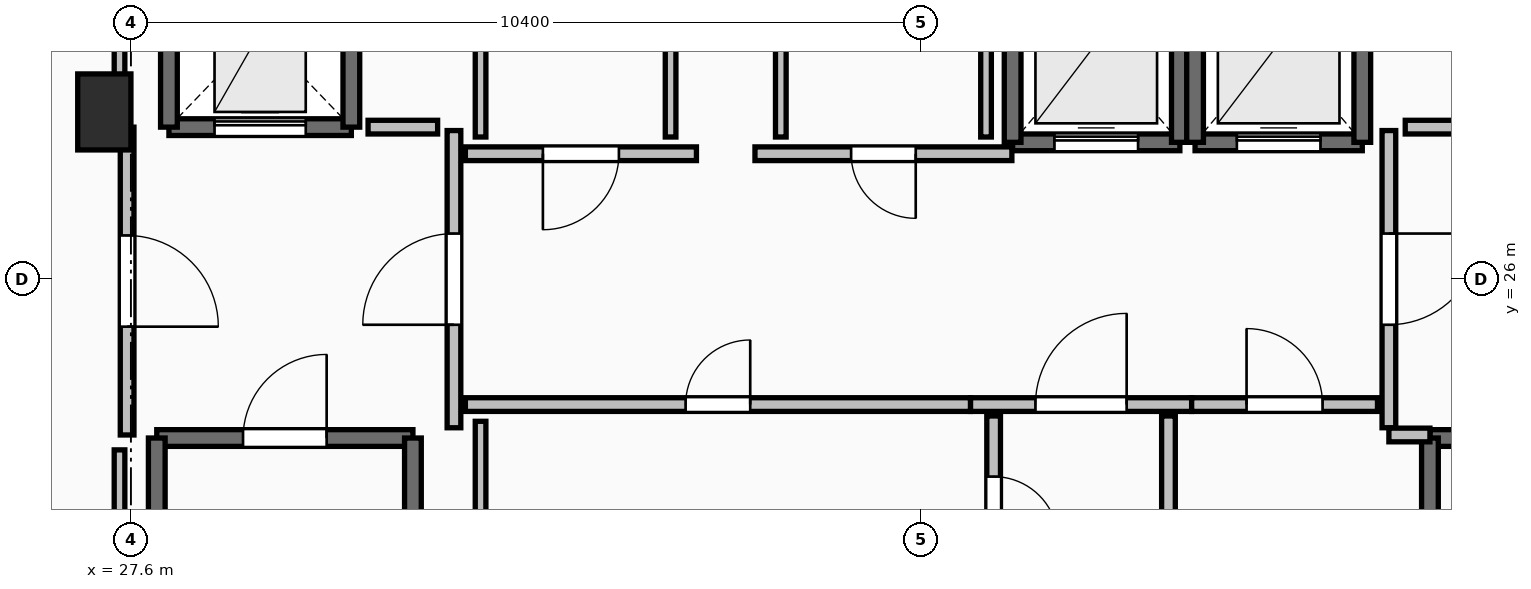
"""IFC4 building model, lengths in metres.
Left out: names, types, materials, properties, quantities, classifications, styles, units other than length and angle.
Written with IfcOpenShell. Run it as: python <this file> out.ifc"""

import sys

from ifc_helpers import new_model, si_unit, direction, frame, frame_2d, origin, origin_2d, place, context, subcontext, project, spatial, rectangle, extrude, element, fill, save


model = new_model("IFC4")
c1 = context("Model", 3, precision=1e-05, world=origin(), true_north=direction((0.0, 1.0)))
c2 = subcontext(c1, "Body", "Model", "MODEL_VIEW")
j1 = project(units=[si_unit("LENGTHUNIT", "METRE"), si_unit("PLANEANGLEUNIT", "RADIAN")], contexts=[c1])
p1 = place(None, origin())
s1 = spatial("IfcSite", under=j1, at=p1, CompositionType="ELEMENT")
p2 = place(p1, origin())
s2 = spatial("IfcBuilding", under=s1, at=p2, CompositionType="ELEMENT")
p3 = place(p2, frame((0.0, 0.0, 273.3)))
s3 = spatial("IfcBuildingStorey", under=s2, at=p3, CompositionType="ELEMENT", Elevation=273.3)
p4 = place(p3, frame((27.25, 28.2, 0.0), z_axis=(0.0, 0.0, 1.0), x_axis=(1.0, 0.0, 0.0)))
e1 = element("IfcColumn", 1, at=p4, inside=s3, PredefinedType="PILASTER", context=c2, shape_type="SweptSolid", body=[
    extrude(rectangle(XDim=0.7, YDim=1.0, at=origin_2d()), origin(), (0.0, 0.0, 1.0), 3.55),
])
p5 = place(p3, frame((27.94, 23.91, 0.0), z_axis=(0.0, 0.0, 1.0), x_axis=(1.0, 0.0, 0.0)))
e2 = element("IfcWall", 2, at=p5, inside=s3, PredefinedType="SOLIDWALL", context=c2, shape_type="SweptSolid", body=[
    extrude(rectangle(XDim=3.37, YDim=0.22, at=frame_2d((1.685, 0.0))), origin(), (0.0, 0.0, 1.0), 3.29),
])
p6 = place(p5, frame((1.135, 0.0, 0.0)))
e3 = element("IfcOpeningElement", 3, at=p6, cuts=e2, PredefinedType="OPENING", context=c2, shape_type="SweptSolid", body=[
    extrude(rectangle(XDim=1.1, YDim=2.15, at=frame_2d((0.55, 1.075))), frame((0.0, 0.125, 0.0), z_axis=(0.0, -1.0, 0.0), x_axis=(1.0, 0.0, 0.0)), (0.0, 0.0, 1.0), 0.25),
])
for number, where, z_axis, x_axis in (
    (4, (31.31, 23.91, 0.0), (0.0, 0.0, 1.0), (0.0, -1.0, 0.0)),
    (5, (27.94, 16.49, 0.0), (0.0, 0.0, 1.0), (0.0, 1.0, 0.0)),
):
    element("IfcWall", number, at=place(p3, frame(where, z_axis=z_axis, x_axis=x_axis)), inside=s3, PredefinedType="SOLIDWALL", context=c2, shape_type="SweptSolid", body=[
        extrude(rectangle(XDim=7.42, YDim=0.22, at=frame_2d((3.71, 0.0))), origin(), (0.0, 0.0, 1.0), 3.29),
    ])
p7 = place(p3, frame((44.69, 23.91, 0.0), z_axis=(0.0, 0.0, 1.0), x_axis=(1.0, 0.0, 0.0)))
e6 = element("IfcWall", 6, at=p7, inside=s3, PredefinedType="SOLIDWALL", context=c2, shape_type="SweptSolid", body=[
    extrude(rectangle(XDim=3.37, YDim=0.22, at=frame_2d((1.685, 0.0))), origin(), (0.0, 0.0, 1.0), 3.29),
])
p8 = place(p7, frame((1.135, 0.0, 0.0)))
e7 = element("IfcOpeningElement", 7, at=p8, cuts=e6, PredefinedType="OPENING", context=c2, shape_type="SweptSolid", body=[
    extrude(rectangle(XDim=1.1, YDim=2.15, at=frame_2d((0.55, 1.075))), frame((0.0, 0.125, 0.0), z_axis=(0.0, -1.0, 0.0), x_axis=(1.0, 0.0, 0.0)), (0.0, 0.0, 1.0), 0.25),
])
p9 = place(p3, frame((44.69, 16.49, 0.0), z_axis=(0.0, 0.0, 1.0), x_axis=(0.0, 1.0, 0.0)))
e8 = element("IfcWall", 8, at=p9, inside=s3, PredefinedType="SOLIDWALL", context=c2, shape_type="SweptSolid", body=[
    extrude(rectangle(XDim=7.42, YDim=0.22, at=frame_2d((3.71, 0.0))), origin(), (0.0, 0.0, 1.0), 3.29),
])
p10 = place(p3, frame((39.2, 27.8, 0.0), z_axis=(0.0, 0.0, 1.0), x_axis=(1.0, 0.0, 0.0)))
e9 = element("IfcWall", 9, at=p10, inside=s3, PredefinedType="SOLIDWALL", context=c2, shape_type="SweptSolid", body=[
    extrude(rectangle(XDim=2.2, YDim=0.22, at=frame_2d((1.1, 0.0))), origin(), (0.0, 0.0, 1.0), 3.29),
])
p11 = place(p10, frame((0.55, 0.0, 0.0)))
e10 = element("IfcOpeningElement", 10, at=p11, cuts=e9, PredefinedType="OPENING", context=c2, shape_type="SweptSolid", body=[
    extrude(rectangle(XDim=1.1, YDim=2.2, at=frame_2d((0.55, 1.1))), frame((0.0, 0.125, 0.0), z_axis=(0.0, -1.0, 0.0), x_axis=(1.0, 0.0, 0.0)), (0.0, 0.0, 1.0), 0.25),
])
for number, where, z_axis, x_axis in (
    (11, (41.4, 27.8, 0.0), (0.0, 0.0, 1.0), (0.0, 1.0, 0.0)),
    (12, (39.2, 30.4, 0.0), (0.0, 0.0, 1.0), (0.0, -1.0, 0.0)),
):
    element("IfcWall", number, at=place(p3, frame(where, z_axis=z_axis, x_axis=x_axis)), inside=s3, PredefinedType="SOLIDWALL", context=c2, shape_type="SweptSolid", body=[
        extrude(rectangle(XDim=2.6, YDim=0.22, at=frame_2d((1.3, 0.0))), origin(), (0.0, 0.0, 1.0), 3.29),
    ])
p12 = place(p3, frame((41.6, 27.8, 0.0), z_axis=(0.0, 0.0, 1.0), x_axis=(1.0, 0.0, 0.0)))
e13 = element("IfcWall", 13, at=p12, inside=s3, PredefinedType="SOLIDWALL", context=c2, shape_type="SweptSolid", body=[
    extrude(rectangle(XDim=2.2, YDim=0.22, at=frame_2d((1.1, 0.0))), origin(), (0.0, 0.0, 1.0), 3.29),
])
p13 = place(p12, frame((0.55, 0.0, 0.0)))
e14 = element("IfcOpeningElement", 14, at=p13, cuts=e13, PredefinedType="OPENING", context=c2, shape_type="SweptSolid", body=[
    extrude(rectangle(XDim=1.1, YDim=2.2, at=frame_2d((0.55, 1.1))), frame((0.0, 0.125, 0.0), z_axis=(0.0, -1.0, 0.0), x_axis=(1.0, 0.0, 0.0)), (0.0, 0.0, 1.0), 0.25),
])
for number, where, z_axis, x_axis in (
    (15, (43.8, 27.8, 0.0), (0.0, 0.0, 1.0), (0.0, 1.0, 0.0)),
    (16, (41.6, 30.4, 0.0), (0.0, 0.0, 1.0), (0.0, -1.0, 0.0)),
):
    element("IfcWall", number, at=place(p3, frame(where, z_axis=z_axis, x_axis=x_axis)), inside=s3, PredefinedType="SOLIDWALL", context=c2, shape_type="SweptSolid", body=[
        extrude(rectangle(XDim=2.6, YDim=0.22, at=frame_2d((1.3, 0.0))), origin(), (0.0, 0.0, 1.0), 3.29),
    ])
p14 = place(p3, frame((28.1, 28.0, 0.0), z_axis=(0.0, 0.0, 1.0), x_axis=(1.0, 0.0, 0.0)))
e17 = element("IfcWall", 17, at=p14, inside=s3, PredefinedType="SHEAR", context=c2, shape_type="SweptSolid", body=[
    extrude(rectangle(XDim=2.4, YDim=0.22, at=frame_2d((1.2, 0.0))), origin(), (0.0, 0.0, 1.0), 3.29),
])
p15 = place(p14, frame((0.6, 0.0, 0.0)))
e18 = element("IfcOpeningElement", 18, at=p15, cuts=e17, PredefinedType="OPENING", context=c2, shape_type="SweptSolid", body=[
    extrude(rectangle(XDim=1.2, YDim=2.2, at=frame_2d((0.6, 1.1))), frame((0.0, 0.125, 0.0), z_axis=(0.0, -1.0, 0.0), x_axis=(1.0, 0.0, 0.0)), (0.0, 0.0, 1.0), 0.25),
])
for number, where, z_axis, x_axis in (
    (19, (30.5, 28.0, 0.0), (0.0, 0.0, 1.0), (0.0, 1.0, 0.0)),
    (20, (28.1, 30.5, 0.0), (0.0, 0.0, 1.0), (0.0, -1.0, 0.0)),
):
    element("IfcWall", number, at=place(p3, frame(where, z_axis=z_axis, x_axis=x_axis)), inside=s3, PredefinedType="SHEAR", context=c2, shape_type="SweptSolid", body=[
        extrude(rectangle(XDim=2.5, YDim=0.22, at=frame_2d((1.25, 0.0))), origin(), (0.0, 0.0, 1.0), 3.29),
    ])
p16 = place(p3, frame((31.85, 24.045, 0.0), z_axis=(0.0, 0.0, 1.0), x_axis=(0.0, 1.0, 0.0)))
e21 = element("IfcWall", 21, at=p16, inside=s3, PredefinedType="PARTITIONING", context=c2, shape_type="SweptSolid", body=[
    extrude(rectangle(XDim=3.91, YDim=0.18, at=frame_2d((1.955, 0.0))), origin(), (0.0, 0.0, 1.0), 3.29),
])
p17 = place(p16, frame((1.355, 0.0, 0.0)))
e22 = element("IfcOpeningElement", 22, at=p17, cuts=e21, PredefinedType="OPENING", context=c2, shape_type="SweptSolid", body=[
    extrude(rectangle(XDim=1.2, YDim=2.15, at=frame_2d((0.6, 1.075))), frame((0.0, 0.105, 0.0), z_axis=(0.0, -1.0, 0.0), x_axis=(1.0, 0.0, 0.0)), (0.0, 0.0, 1.0), 0.21),
])
p18 = place(p3, frame((27.55, 28.0, 0.0), z_axis=(0.0, 0.0, 1.0), x_axis=(0.0, -1.0, 0.0)))
e23 = element("IfcWall", 23, at=p18, inside=s3, PredefinedType="PARTITIONING", context=c2, shape_type="SweptSolid", body=[
    extrude(rectangle(XDim=4.05, YDim=0.18, at=frame_2d((2.025, 0.0))), origin(), (0.0, 0.0, 1.0), 3.29),
])
p19 = place(p18, frame((1.425, 0.0, 0.0)))
e24 = element("IfcOpeningElement", 24, at=p19, cuts=e23, PredefinedType="OPENING", context=c2, shape_type="SweptSolid", body=[
    extrude(rectangle(XDim=1.2, YDim=2.15, at=frame_2d((0.6, 1.075))), frame((0.0, 0.105, 0.0), z_axis=(0.0, -1.0, 0.0), x_axis=(1.0, 0.0, 0.0)), (0.0, 0.0, 1.0), 0.21),
])
p20 = place(p3, frame((44.15, 27.955, 0.0), z_axis=(0.0, 0.0, 1.0), x_axis=(0.0, -1.0, 0.0)))
e25 = element("IfcWall", 25, at=p20, inside=s3, PredefinedType="PARTITIONING", context=c2, shape_type="SweptSolid", body=[
    extrude(rectangle(XDim=3.91, YDim=0.18, at=frame_2d((1.955, 0.0))), origin(), (0.0, 0.0, 1.0), 3.29),
])
p21 = place(p20, frame((1.355, 0.0, 0.0)))
e26 = element("IfcOpeningElement", 26, at=p21, cuts=e25, PredefinedType="OPENING", context=c2, shape_type="SweptSolid", body=[
    extrude(rectangle(XDim=1.2, YDim=2.15, at=frame_2d((0.6, 1.075))), frame((0.0, 0.105, 0.0), z_axis=(0.0, -1.0, 0.0), x_axis=(1.0, 0.0, 0.0)), (0.0, 0.0, 1.0), 0.21),
])
p22 = place(p3, frame((44.15, 23.95, 0.0), z_axis=(0.0, 0.0, 1.0), x_axis=(1.0, 0.0, 0.0)))
e27 = element("IfcWall", 27, at=p22, inside=s3, PredefinedType="PARTITIONING", context=c2, shape_type="SweptSolid", body=[
    extrude(rectangle(XDim=0.54, YDim=0.18, at=frame_2d((0.27, 0.0))), origin(), (0.0, 0.0, 1.0), 3.29),
])
p23 = place(p3, frame((38.645, 24.35, 0.0), z_axis=(0.0, 0.0, 1.0), x_axis=(1.0, 0.0, 0.0)))
e28 = element("IfcWall", 28, at=p23, inside=s3, PredefinedType="PARTITIONING", context=c2, shape_type="SweptSolid", body=[
    extrude(rectangle(XDim=2.91, YDim=0.18, at=frame_2d((1.455, 0.0))), origin(), (0.0, 0.0, 1.0), 3.29),
])
p24 = place(p23, frame((0.855, 0.0, 0.0)))
e29 = element("IfcOpeningElement", 29, at=p24, cuts=e28, PredefinedType="OPENING", context=c2, shape_type="SweptSolid", body=[
    extrude(rectangle(XDim=1.2, YDim=2.15, at=frame_2d((0.6, 1.075))), frame((0.0, 0.105, 0.0), z_axis=(0.0, -1.0, 0.0), x_axis=(1.0, 0.0, 0.0)), (0.0, 0.0, 1.0), 0.21),
])
p25 = place(p3, frame((41.555, 24.35, 0.0), z_axis=(0.0, 0.0, 1.0), x_axis=(1.0, 0.0, 0.0)))
e30 = element("IfcWall", 30, at=p25, inside=s3, PredefinedType="PARTITIONING", context=c2, shape_type="SweptSolid", body=[
    extrude(rectangle(XDim=2.445, YDim=0.18, at=frame_2d((1.223, 0.0))), origin(), (0.0, 0.0, 1.0), 3.29),
])
p26 = place(p25, frame((0.722, 0.0, 0.0)))
e31 = element("IfcOpeningElement", 31, at=p26, cuts=e30, PredefinedType="OPENING", context=c2, shape_type="SweptSolid", body=[
    extrude(rectangle(XDim=1.0, YDim=2.15, at=frame_2d((0.5, 1.075))), frame((0.0, 0.105, 0.0), z_axis=(0.0, -1.0, 0.0), x_axis=(1.0, 0.0, 0.0)), (0.0, 0.0, 1.0), 0.21),
])
p27 = place(p3, frame((35.04, 27.65, 0.0), z_axis=(0.0, 0.0, 1.0), x_axis=(-1.0, 0.0, 0.0)))
e32 = element("IfcWall", 32, at=p27, inside=s3, PredefinedType="PARTITIONING", context=c2, shape_type="SweptSolid", body=[
    extrude(rectangle(XDim=3.04, YDim=0.18, at=frame_2d((1.52, 0.0))), origin(), (0.0, 0.0, 1.0), 3.29),
])
p28 = place(p27, frame((1.02, 0.0, 0.0)))
e33 = element("IfcOpeningElement", 33, at=p28, cuts=e32, PredefinedType="OPENING", context=c2, shape_type="SweptSolid", body=[
    extrude(rectangle(XDim=1.0, YDim=2.15, at=frame_2d((0.5, 1.075))), frame((0.0, 0.105, 0.0), z_axis=(0.0, -1.0, 0.0), x_axis=(1.0, 0.0, 0.0)), (0.0, 0.0, 1.0), 0.21),
])
p29 = place(p3, frame((39.19, 27.65, 0.0), z_axis=(0.0, 0.0, 1.0), x_axis=(-1.0, 0.0, 0.0)))
e34 = element("IfcWall", 34, at=p29, inside=s3, PredefinedType="PARTITIONING", context=c2, shape_type="SweptSolid", body=[
    extrude(rectangle(XDim=3.38, YDim=0.18, at=frame_2d((1.69, 0.0))), origin(), (0.0, 0.0, 1.0), 3.29),
])
p30 = place(p29, frame((1.265, 0.0, 0.0)))
e35 = element("IfcOpeningElement", 35, at=p30, cuts=e34, PredefinedType="OPENING", context=c2, shape_type="SweptSolid", body=[
    extrude(rectangle(XDim=0.85, YDim=2.1, at=frame_2d((0.425, 1.05))), frame((0.0, 0.105, 0.0), z_axis=(0.0, -1.0, 0.0), x_axis=(1.0, 0.0, 0.0)), (0.0, 0.0, 1.0), 0.21),
])
p31 = place(p3, frame((32.0, 24.35, 0.0), z_axis=(0.0, 0.0, 1.0), x_axis=(1.0, 0.0, 0.0)))
e36 = element("IfcWall", 36, at=p31, inside=s3, PredefinedType="PARTITIONING", context=c2, shape_type="SweptSolid", body=[
    extrude(rectangle(XDim=6.645, YDim=0.18, at=frame_2d((3.323, 0.0))), origin(), (0.0, 0.0, 1.0), 3.29),
])
p32 = place(p31, frame((2.897, 0.0, 0.0)))
e37 = element("IfcOpeningElement", 37, at=p32, cuts=e36, PredefinedType="OPENING", context=c2, shape_type="SweptSolid", body=[
    extrude(rectangle(XDim=0.85, YDim=2.1, at=frame_2d((0.425, 1.05))), frame((0.0, 0.105, 0.0), z_axis=(0.0, -1.0, 0.0), x_axis=(1.0, 0.0, 0.0)), (0.0, 0.0, 1.0), 0.21),
])
p33 = place(p3, frame((41.25, 20.305, 0.0), z_axis=(0.0, 0.0, 1.0), x_axis=(0.0, 1.0, 0.0)))
e38 = element("IfcWall", 38, at=p33, inside=s3, PredefinedType="PARTITIONING", context=c2, shape_type="SweptSolid", body=[
    extrude(rectangle(XDim=3.895, YDim=0.18, at=frame_2d((1.948, 0.0))), origin(), (0.0, 0.0, 1.0), 2.482),
])
p34 = place(p33, frame((1.448, 0.0, 0.0)))
e39 = element("IfcOpeningElement", 39, at=p34, cuts=e38, PredefinedType="OPENING", context=c2, shape_type="SweptSolid", body=[
    extrude(rectangle(XDim=1.0, YDim=2.15, at=frame_2d((0.5, 1.075))), frame((0.0, 0.105, 0.0), z_axis=(0.0, -1.0, 0.0), x_axis=(1.0, 0.0, 0.0)), (0.0, 0.0, 1.0), 0.21),
])
p35 = place(p3, frame((38.95, 24.2, 0.0), z_axis=(0.0, 0.0, 1.0), x_axis=(0.0, -1.0, 0.0)))
e40 = element("IfcWall", 40, at=p35, inside=s3, PredefinedType="PARTITIONING", context=c2, shape_type="SweptSolid", body=[
    extrude(rectangle(XDim=2.445, YDim=0.18, at=frame_2d((1.223, 0.0))), origin(), (0.0, 0.0, 1.0), 2.482),
])
p36 = place(p35, frame((0.798, 0.0, 0.0)))
e41 = element("IfcOpeningElement", 41, at=p36, cuts=e40, PredefinedType="OPENING", context=c2, shape_type="SweptSolid", body=[
    extrude(rectangle(XDim=0.85, YDim=2.1, at=frame_2d((0.425, 1.05))), frame((0.0, 0.105, 0.0), z_axis=(0.0, -1.0, 0.0), x_axis=(1.0, 0.0, 0.0)), (0.0, 0.0, 1.0), 0.21),
])
for number, where, z_axis, x_axis in (
    (42, (31.635, 28.0, 0.0), (0.0, 0.0, 1.0), (-1.0, 0.0, 0.0)),
    (43, (45.28, 28.0, 0.0), (0.0, 0.0, 1.0), (-1.0, 0.0, 0.0)),
):
    element("IfcWall", number, at=place(p3, frame(where, z_axis=z_axis, x_axis=x_axis)), inside=s3, PredefinedType="PARTITIONING", context=c2, shape_type="SweptSolid", body=[
        extrude(rectangle(XDim=0.915, YDim=0.18, at=frame_2d((0.458, 0.0))), origin(), (0.0, 0.0, 1.0), 3.29),
    ])
for number, where, z_axis, x_axis in (
    (44, (32.2, 30.26, 0.0), (0.0, 0.0, 1.0), (0.0, -1.0, 0.0)),
    (45, (34.7, 27.87, 0.0), (0.0, 0.0, 1.0), (0.0, 1.0, 0.0)),
    (46, (36.15, 30.26, 0.0), (0.0, 0.0, 1.0), (0.0, -1.0, 0.0)),
    (47, (38.85, 27.87, 0.0), (0.0, 0.0, 1.0), (0.0, 1.0, 0.0)),
):
    element("IfcWall", number, at=place(p3, frame(where, z_axis=z_axis, x_axis=x_axis)), inside=s3, PredefinedType="PARTITIONING", context=c2, shape_type="SweptSolid", body=[
        extrude(rectangle(XDim=2.39, YDim=0.14, at=frame_2d((1.195, 0.0))), origin(), (0.0, 0.0, 1.0), 3.29),
    ])
p37 = place(p3, frame((32.2, 24.13, 0.0), z_axis=(0.0, 0.0, 1.0), x_axis=(0.0, -1.0, 0.0)))
e48 = element("IfcWall", 48, at=p37, inside=s3, PredefinedType="PARTITIONING", context=c2, shape_type="SweptSolid", body=[
    extrude(rectangle(XDim=2.46, YDim=0.14, at=frame_2d((1.23, 0.0))), origin(), (0.0, 0.0, 1.0), 2.482),
])
p38 = place(p3, frame((27.45, 33.45, 0.0), z_axis=(0.0, 0.0, 1.0), x_axis=(0.0, -1.0, 0.0)))
e49 = element("IfcWall", 49, at=p38, inside=s3, PredefinedType="PARTITIONING", context=c2, shape_type="SweptSolid", body=[
    extrude(rectangle(XDim=5.254, YDim=0.14, at=frame_2d((2.627, 0.0))), origin(), (0.0, 0.0, 1.0), 2.482),
])
p39 = place(p3, frame((27.45, 23.754, 0.0), z_axis=(0.0, 0.0, 1.0), x_axis=(0.0, -1.0, 0.0)))
e50 = element("IfcWall", 50, at=p39, inside=s3, PredefinedType="PARTITIONING", context=c2, shape_type="SweptSolid", body=[
    extrude(rectangle(XDim=7.514, YDim=0.14, at=frame_2d((3.757, 0.0))), origin(), (0.0, 0.0, 1.0), 2.482),
])
p40 = place(p6, origin())
e51 = element("IfcDoor", 51, at=p40, inside=s3, OperationType="SINGLE_SWING_RIGHT", PredefinedType="DOOR", context=c2, shape_type="SweptSolid", body=[
    extrude(rectangle(XDim=1.1, YDim=2.15, at=frame_2d((0.55, 1.075))), frame((0.0, 0.025, 0.0), z_axis=(0.0, -1.0, 0.0), x_axis=(1.0, 0.0, 0.0)), (0.0, 0.0, 1.0), 0.05),
])
fill(e3, e51)
p41 = place(p11, origin())
e52 = element("IfcDoor", 52, at=p41, inside=s3, OperationType="SLIDING_TO_LEFT", PredefinedType="DOOR", context=c2, shape_type="SweptSolid", body=[
    extrude(rectangle(XDim=1.1, YDim=2.2, at=frame_2d((0.55, 1.1))), frame((0.0, 0.025, 0.0), z_axis=(0.0, -1.0, 0.0), x_axis=(1.0, 0.0, 0.0)), (0.0, 0.0, 1.0), 0.05),
])
fill(e10, e52)
p42 = place(p13, origin())
e53 = element("IfcDoor", 53, at=p42, inside=s3, OperationType="SLIDING_TO_LEFT", PredefinedType="DOOR", context=c2, shape_type="SweptSolid", body=[
    extrude(rectangle(XDim=1.1, YDim=2.2, at=frame_2d((0.55, 1.1))), frame((0.0, 0.025, 0.0), z_axis=(0.0, -1.0, 0.0), x_axis=(1.0, 0.0, 0.0)), (0.0, 0.0, 1.0), 0.05),
])
fill(e14, e53)
p43 = place(p15, origin())
e54 = element("IfcDoor", 54, at=p43, inside=s3, OperationType="SLIDING_TO_LEFT", PredefinedType="DOOR", context=c2, shape_type="SweptSolid", body=[
    extrude(rectangle(XDim=1.2, YDim=2.2, at=frame_2d((0.6, 1.1))), frame((0.0, 0.025, 0.0), z_axis=(0.0, -1.0, 0.0), x_axis=(1.0, 0.0, 0.0)), (0.0, 0.0, 1.0), 0.05),
])
fill(e18, e54)
p44 = place(p17, origin())
e55 = element("IfcDoor", 55, at=p44, inside=s3, OperationType="SINGLE_SWING_LEFT", PredefinedType="DOOR", context=c2, shape_type="SweptSolid", body=[
    extrude(rectangle(XDim=1.2, YDim=2.15, at=frame_2d((0.6, 1.075))), frame((0.0, 0.025, 0.0), z_axis=(0.0, -1.0, 0.0), x_axis=(1.0, 0.0, 0.0)), (0.0, 0.0, 1.0), 0.05),
])
fill(e22, e55)
p45 = place(p19, origin())
e56 = element("IfcDoor", 56, at=p45, inside=s3, OperationType="SINGLE_SWING_RIGHT", PredefinedType="DOOR", context=c2, shape_type="SweptSolid", body=[
    extrude(rectangle(XDim=1.2, YDim=2.15, at=frame_2d((0.6, 1.075))), frame((0.0, 0.025, 0.0), z_axis=(0.0, -1.0, 0.0), x_axis=(1.0, 0.0, 0.0)), (0.0, 0.0, 1.0), 0.05),
])
fill(e24, e56)
p46 = place(p21, origin())
e57 = element("IfcDoor", 57, at=p46, inside=s3, OperationType="SINGLE_SWING_LEFT", PredefinedType="DOOR", context=c2, shape_type="SweptSolid", body=[
    extrude(rectangle(XDim=1.2, YDim=2.15, at=frame_2d((0.6, 1.075))), frame((0.0, 0.025, 0.0), z_axis=(0.0, -1.0, 0.0), x_axis=(1.0, 0.0, 0.0)), (0.0, 0.0, 1.0), 0.05),
])
fill(e26, e57)
p47 = place(p24, origin())
e58 = element("IfcDoor", 58, at=p47, inside=s3, OperationType="SINGLE_SWING_RIGHT", PredefinedType="DOOR", context=c2, shape_type="SweptSolid", body=[
    extrude(rectangle(XDim=1.2, YDim=2.15, at=frame_2d((0.6, 1.075))), frame((0.0, 0.025, 0.0), z_axis=(0.0, -1.0, 0.0), x_axis=(1.0, 0.0, 0.0)), (0.0, 0.0, 1.0), 0.05),
])
fill(e29, e58)
p48 = place(p26, origin())
e59 = element("IfcDoor", 59, at=p48, inside=s3, OperationType="SINGLE_SWING_LEFT", PredefinedType="DOOR", context=c2, shape_type="SweptSolid", body=[
    extrude(rectangle(XDim=1.0, YDim=2.15, at=frame_2d((0.5, 1.075))), frame((0.0, 0.025, 0.0), z_axis=(0.0, -1.0, 0.0), x_axis=(1.0, 0.0, 0.0)), (0.0, 0.0, 1.0), 0.05),
])
fill(e31, e59)
p49 = place(p28, origin())
e60 = element("IfcDoor", 60, at=p49, inside=s3, OperationType="SINGLE_SWING_RIGHT", PredefinedType="DOOR", context=c2, shape_type="SweptSolid", body=[
    extrude(rectangle(XDim=1.0, YDim=2.15, at=frame_2d((0.5, 1.075))), frame((0.0, 0.025, 0.0), z_axis=(0.0, -1.0, 0.0), x_axis=(1.0, 0.0, 0.0)), (0.0, 0.0, 1.0), 0.05),
])
fill(e33, e60)
p50 = place(p30, origin())
e61 = element("IfcDoor", 61, at=p50, inside=s3, OperationType="SINGLE_SWING_LEFT", PredefinedType="DOOR", context=c2, shape_type="SweptSolid", body=[
    extrude(rectangle(XDim=0.85, YDim=2.1, at=frame_2d((0.425, 1.05))), frame((0.0, 0.025, 0.0), z_axis=(0.0, -1.0, 0.0), x_axis=(1.0, 0.0, 0.0)), (0.0, 0.0, 1.0), 0.05),
])
fill(e35, e61)
p51 = place(p32, origin())
e62 = element("IfcDoor", 62, at=p51, inside=s3, OperationType="SINGLE_SWING_RIGHT", PredefinedType="DOOR", context=c2, shape_type="SweptSolid", body=[
    extrude(rectangle(XDim=0.85, YDim=2.1, at=frame_2d((0.425, 1.05))), frame((0.0, 0.025, 0.0), z_axis=(0.0, -1.0, 0.0), x_axis=(1.0, 0.0, 0.0)), (0.0, 0.0, 1.0), 0.05),
])
fill(e37, e62)
p52 = place(p36, origin())
e63 = element("IfcDoor", 63, at=p52, inside=s3, OperationType="SINGLE_SWING_RIGHT", PredefinedType="DOOR", context=c2, shape_type="SweptSolid", body=[
    extrude(rectangle(XDim=0.85, YDim=2.1, at=frame_2d((0.425, 1.05))), frame((0.0, 0.025, 0.0), z_axis=(0.0, -1.0, 0.0), x_axis=(1.0, 0.0, 0.0)), (0.0, 0.0, 1.0), 0.05),
])
fill(e41, e63)
save(model, sys.argv[1])
